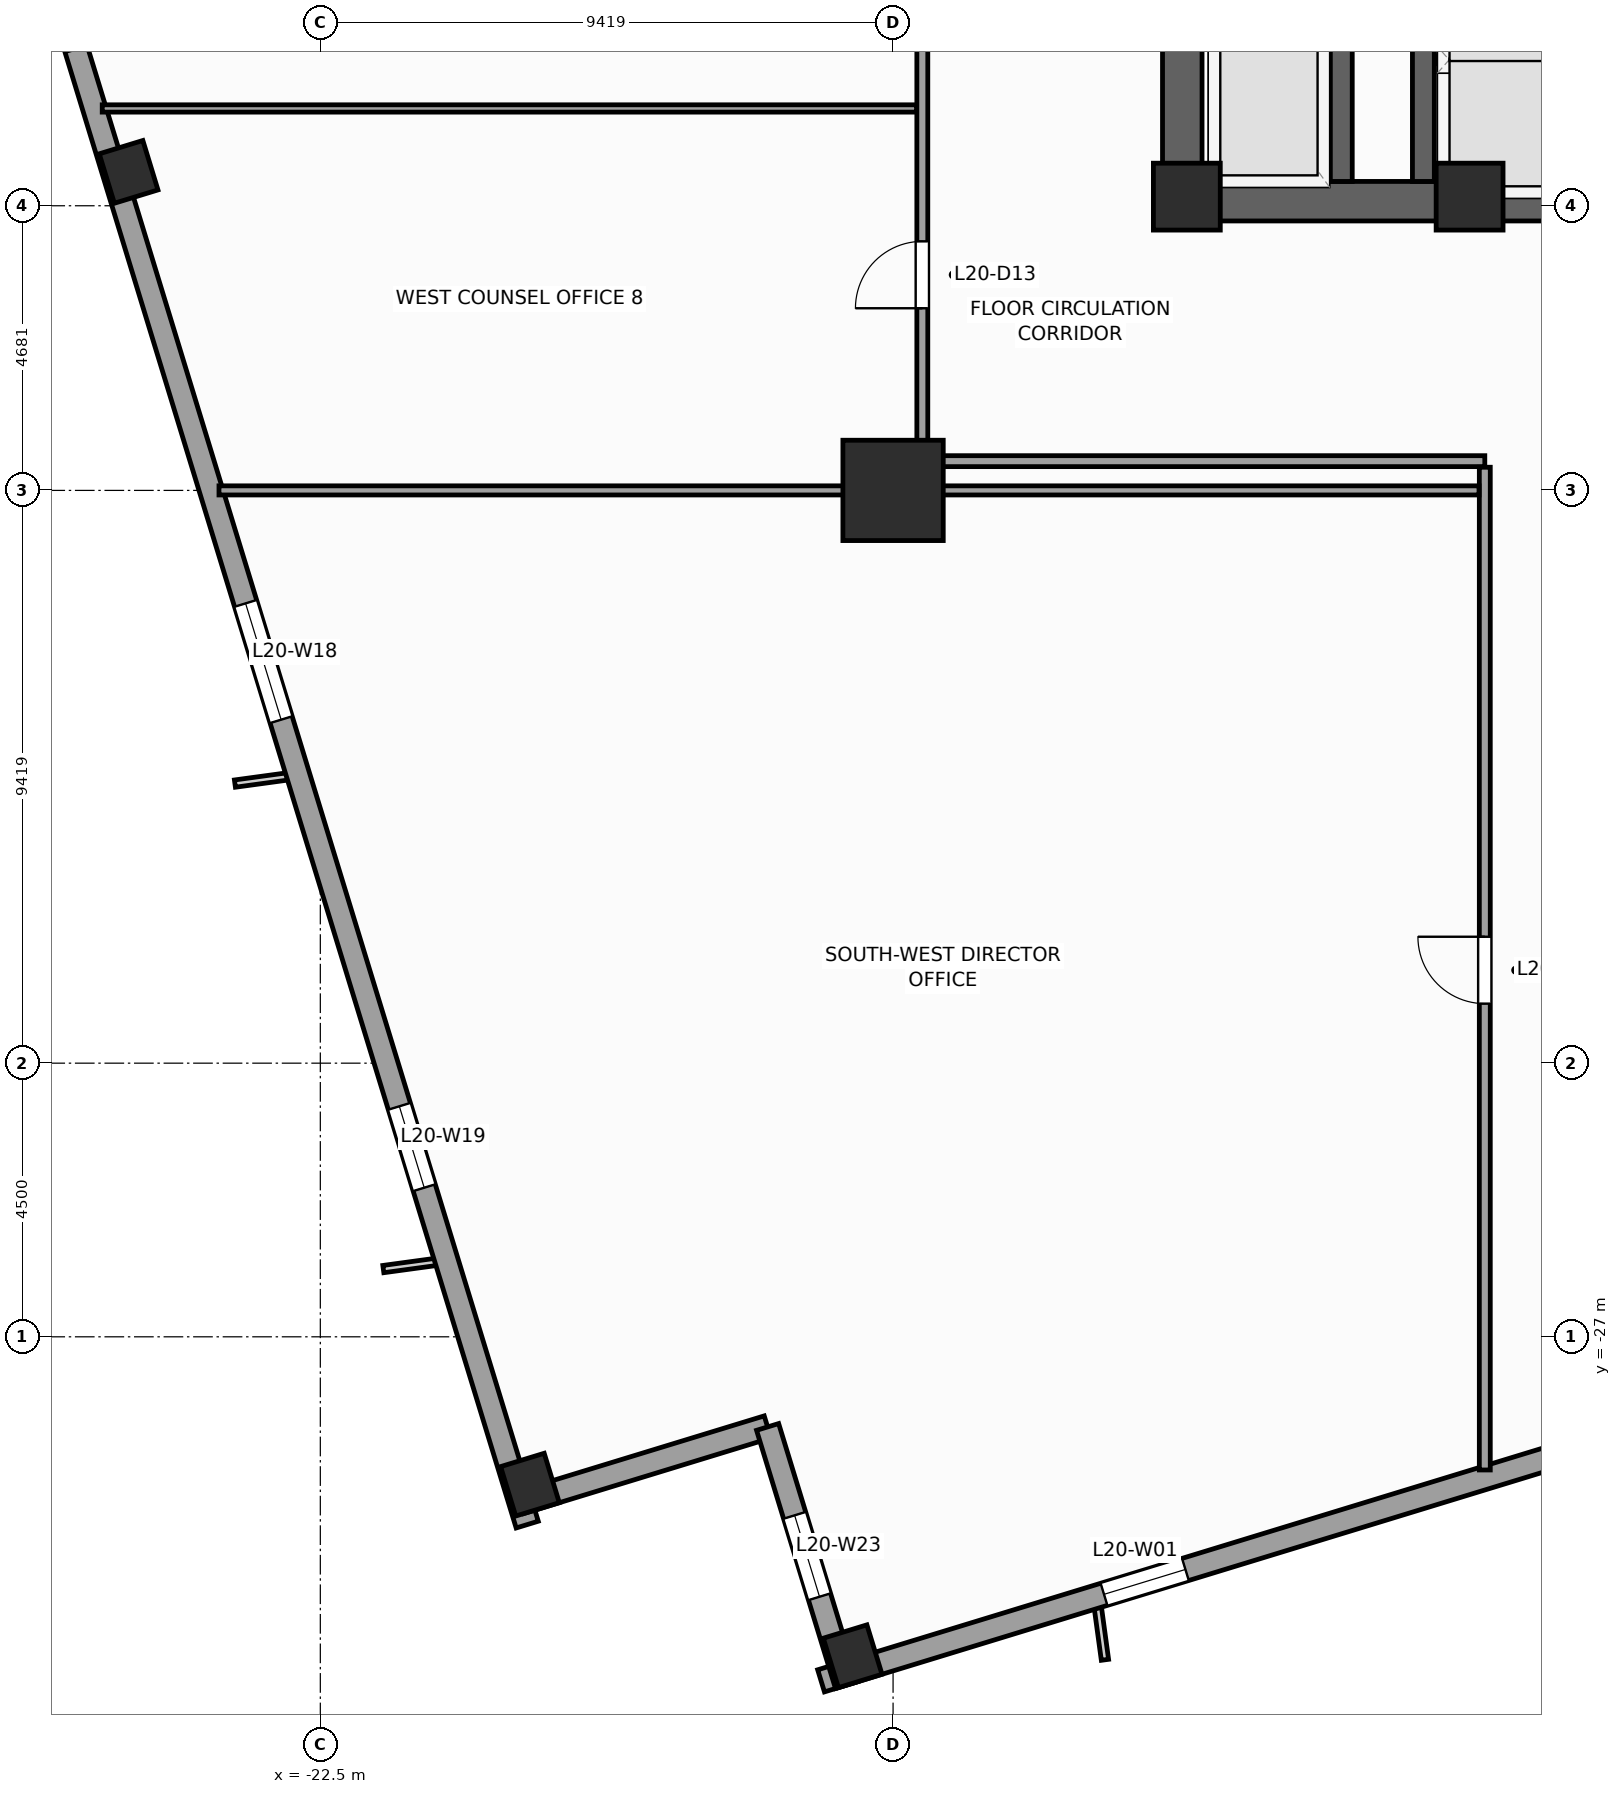
"""IFC4 building model, lengths in metres.
Left out: names, types, materials, properties, quantities, classifications, styles, units other than length and angle.
Written with IfcOpenShell. Run it as: python <this file> out.ifc"""

import sys

from ifc_helpers import new_model, si_unit, direction, frame, frame_2d, origin, origin_2d, place, context, subcontext, project, spatial, rectangle, extrude, source, transform, mapped, element, fill, save


model = new_model("IFC4")
c1 = context("Model", 3, precision=1e-05, world=origin(), true_north=direction((0.0, 1.0)))
c2 = subcontext(c1, "Body", "Model", "MODEL_VIEW")
j1 = project(units=[si_unit("LENGTHUNIT", "METRE"), si_unit("PLANEANGLEUNIT", "RADIAN")], contexts=[c1])
p1 = place(None, origin())
s1 = spatial("IfcSite", under=j1, at=p1, CompositionType="ELEMENT")
p2 = place(p1, origin())
s2 = spatial("IfcBuilding", under=s1, at=p2, CompositionType="ELEMENT")
p3 = place(p2, frame((0.0, 0.0, 87.2)))
s3 = spatial("IfcBuildingStorey", under=s2, at=p3, CompositionType="ELEMENT", Elevation=87.2)
p4 = place(p3, frame((-8.65, -8.325, 0.0), z_axis=(0.0, 0.0, 1.0), x_axis=(1.0, 0.0, 0.0)))
e1 = element("IfcWall", 1, at=p4, inside=s3, PredefinedType="SHEAR", context=c2, shape_type="SweptSolid", body=[
    extrude(rectangle(XDim=17.3, YDim=0.65, at=frame_2d((8.65, 0.0))), origin(), (0.0, 0.0, 1.0), 4.0),
])
p5 = place(p4, frame((8.0, 0.0, 0.0)))
e2 = element("IfcOpeningElement", 2, at=p5, cuts=e1, PredefinedType="OPENING", context=c2, shape_type="SweptSolid", body=[
    extrude(rectangle(XDim=1.3, YDim=2.2, at=frame_2d((0.65, 1.1))), frame((0.0, 0.335, 0.0), z_axis=(0.0, -1.0, 0.0), x_axis=(1.0, 0.0, 0.0)), (0.0, 0.0, 1.0), 0.67),
])
p6 = place(p3, frame((-8.325, -8.0, 0.0), z_axis=(0.0, 0.0, 1.0), x_axis=(0.0, 1.0, 0.0)))
e3 = element("IfcWall", 3, at=p6, inside=s3, PredefinedType="SHEAR", context=c2, shape_type="SweptSolid", body=[
    extrude(rectangle(XDim=16.0, YDim=0.65, at=frame_2d((8.0, 0.0))), origin(), (0.0, 0.0, 1.0), 4.0),
])
p7 = place(p6, frame((4.69, 0.0, 0.0)))
e4 = element("IfcOpeningElement", 4, at=p7, cuts=e3, PredefinedType="OPENING", context=c2, shape_type="SweptSolid", body=[
    extrude(rectangle(XDim=1.3, YDim=2.2, at=frame_2d((0.65, 1.1))), frame((0.0, 0.335, 0.0), z_axis=(0.0, -1.0, 0.0), x_axis=(1.0, 0.0, 0.0)), (0.0, 0.0, 1.0), 0.67),
])
p8 = place(p3, frame((-4.36, -8.0, 0.0), z_axis=(0.0, 0.0, 1.0), x_axis=(0.0, 1.0, 0.0)))
e5 = element("IfcWall", 5, at=p8, inside=s3, PredefinedType="SHEAR", context=c2, shape_type="SweptSolid", body=[
    extrude(rectangle(XDim=16.0, YDim=0.36, at=frame_2d((8.0, 0.0))), origin(), (0.0, 0.0, 1.0), 4.0),
])
p9 = place(p3, frame((-5.71, -8.0, 0.0), z_axis=(0.0, 0.0, 1.0), x_axis=(0.0, 1.0, 0.0)))
e6 = element("IfcWall", 6, at=p9, inside=s3, PredefinedType="SHEAR", context=c2, shape_type="SweptSolid", body=[
    extrude(rectangle(XDim=2.54, YDim=0.36, at=frame_2d((1.27, 0.0))), origin(), (0.0, 0.0, 1.0), 4.0),
])
m1 = source(origin(), c2, "Body", "SweptSolid", [
    extrude(rectangle(XDim=1.1, YDim=1.1, at=origin_2d()), origin(), (0.0, 0.0, 1.0), 4.0),
])
for number, where, z_axis, x_axis in (
    (7, (-8.25, -8.25, 0.0), (0.0, 0.0, 1.0), (1.0, 0.0, 0.0)),
    (8, (-3.6, -8.25, 0.0), (0.0, 0.0, 1.0), (1.0, 0.0, 0.0)),
):
    element("IfcColumn", number, at=place(p3, frame(where, z_axis=z_axis, x_axis=x_axis)), inside=s3, PredefinedType="PILASTER", context=c2, shape_type="MappedRepresentation", body=[
        mapped(m1, transform((0.0, 0.0, 0.0), scale=1.0)),
    ])
m2 = source(origin(), c2, "Body", "SweptSolid", [
    extrude(rectangle(XDim=1.65, YDim=1.65, at=origin_2d()), origin(), (0.0, 0.0, 1.0), 4.0),
])
p10 = place(p3, frame((-13.081, -13.081, 0.0), z_axis=(0.0, 0.0, 1.0), x_axis=(1.0, 0.0, 0.0)))
e9 = element("IfcColumn", 9, at=p10, inside=s3, PredefinedType="COLUMN", context=c2, shape_type="MappedRepresentation", body=[
    mapped(m2, transform((0.0, 0.0, 0.0), scale=1.0)),
])
m3 = source(origin(), c2, "Body", "SweptSolid", [
    extrude(rectangle(XDim=0.75, YDim=0.85, at=origin_2d()), origin(), (0.0, 0.0, 1.0), 4.0),
])
for number, where, z_axis, x_axis in (
    (10, (-13.746, -32.253, 0.0), (0.0, 0.0, 1.0), (0.956, 0.292, 0.0)),
    (11, (-25.653, -7.843, 0.0), (0.0, 0.0, 1.0), (0.956, 0.292, 0.0)),
    (12, (-19.052, -29.431, 0.0), (0.0, 0.0, 1.0), (0.956, 0.292, 0.0)),
):
    element("IfcColumn", number, at=place(p3, frame(where, z_axis=z_axis, x_axis=x_axis)), inside=s3, PredefinedType="COLUMN", context=c2, shape_type="MappedRepresentation", body=[
        mapped(m3, transform((0.0, 0.0, 0.0), scale=1.0)),
    ])
p11 = place(p3, frame((-14.265, -32.658, 0.0), z_axis=(0.0, 0.0, 1.0), x_axis=(0.956304320851, 0.292373127906, 0.0)))
e13 = element("IfcWall", 13, at=p11, inside=s3, PredefinedType="STANDARD", context=c2, shape_type="SweptSolid", body=[
    extrude(rectangle(XDim=46.38, YDim=0.38, at=frame_2d((23.19, 0.0))), origin(), (0.0, 0.0, 1.0), 3.14),
])
p12 = place(p11, frame((28.265, 0.0, 0.0)))
e14 = element("IfcOpeningElement", 14, at=p12, cuts=e13, PredefinedType="OPENING", context=c2, shape_type="SweptSolid", body=[
    extrude(rectangle(XDim=1.05, YDim=2.25, at=frame_2d((0.525, 1.125))), frame((0.0, 0.2, 0.0), z_axis=(0.0, -1.0, 0.0), x_axis=(1.0, 0.0, 0.0)), (0.0, 0.0, 1.0), 0.4),
])
p13 = place(p11, frame((4.865, 0.0, 0.51)))
e15 = element("IfcOpeningElement", 15, at=p13, cuts=e13, PredefinedType="OPENING", context=c2, shape_type="SweptSolid", body=[
    extrude(rectangle(XDim=1.4, YDim=2.4, at=frame_2d((0.7, 1.2))), frame((0.0, 0.2, 0.0), z_axis=(0.0, -1.0, 0.0), x_axis=(1.0, 0.0, 0.0)), (0.0, 0.0, 1.0), 0.4),
])
p14 = place(p11, frame((14.7, 0.0, 0.51)))
e16 = element("IfcOpeningElement", 16, at=p14, cuts=e13, PredefinedType="OPENING", context=c2, shape_type="SweptSolid", body=[
    extrude(rectangle(XDim=2.0, YDim=2.4, at=frame_2d((1.0, 1.2))), frame((0.0, 0.2, 0.0), z_axis=(0.0, -1.0, 0.0), x_axis=(1.0, 0.0, 0.0)), (0.0, 0.0, 1.0), 0.4),
])
p15 = place(p11, frame((20.512, 0.0, 0.51)))
e17 = element("IfcOpeningElement", 17, at=p15, cuts=e13, PredefinedType="OPENING", context=c2, shape_type="SweptSolid", body=[
    extrude(rectangle(XDim=2.0, YDim=2.4, at=frame_2d((1.0, 1.2))), frame((0.0, 0.2, 0.0), z_axis=(0.0, -1.0, 0.0), x_axis=(1.0, 0.0, 0.0)), (0.0, 0.0, 1.0), 0.4),
])
p16 = place(p11, frame((30.538, 0.0, 0.51)))
e18 = element("IfcOpeningElement", 18, at=p16, cuts=e13, PredefinedType="OPENING", context=c2, shape_type="SweptSolid", body=[
    extrude(rectangle(XDim=2.0, YDim=2.4, at=frame_2d((1.0, 1.2))), frame((0.0, 0.2, 0.0), z_axis=(0.0, -1.0, 0.0), x_axis=(1.0, 0.0, 0.0)), (0.0, 0.0, 1.0), 0.4),
])
p17 = place(p11, frame((39.187, 0.0, 0.51)))
e19 = element("IfcOpeningElement", 19, at=p17, cuts=e13, PredefinedType="OPENING", context=c2, shape_type="SweptSolid", body=[
    extrude(rectangle(XDim=1.4, YDim=2.4, at=frame_2d((0.7, 1.2))), frame((0.0, 0.2, 0.0), z_axis=(0.0, -1.0, 0.0), x_axis=(1.0, 0.0, 0.0)), (0.0, 0.0, 1.0), 0.4),
])
p18 = place(p3, frame((-32.658, 14.265, 0.0), z_axis=(0.0, 0.0, 1.0), x_axis=(0.292373127906, -0.956304320851, 0.0)))
e20 = element("IfcWall", 20, at=p18, inside=s3, PredefinedType="STANDARD", context=c2, shape_type="SweptSolid", body=[
    extrude(rectangle(XDim=46.38, YDim=0.38, at=frame_2d((23.19, 0.0))), origin(), (0.0, 0.0, 1.0), 3.14),
])
p19 = place(p18, frame((4.865, 0.0, 0.51)))
e21 = element("IfcOpeningElement", 21, at=p19, cuts=e20, PredefinedType="OPENING", context=c2, shape_type="SweptSolid", body=[
    extrude(rectangle(XDim=1.4, YDim=2.4, at=frame_2d((0.7, 1.2))), frame((0.0, 0.2, 0.0), z_axis=(0.0, -1.0, 0.0), x_axis=(1.0, 0.0, 0.0)), (0.0, 0.0, 1.0), 0.4),
])
p20 = place(p18, frame((10.95, 0.0, 0.51)))
e22 = element("IfcOpeningElement", 22, at=p20, cuts=e20, PredefinedType="OPENING", context=c2, shape_type="SweptSolid", body=[
    extrude(rectangle(XDim=2.0, YDim=2.4, at=frame_2d((1.0, 1.2))), frame((0.0, 0.2, 0.0), z_axis=(0.0, -1.0, 0.0), x_axis=(1.0, 0.0, 0.0)), (0.0, 0.0, 1.0), 0.4),
])
p21 = place(p18, frame((19.012, 0.0, 0.51)))
e23 = element("IfcOpeningElement", 23, at=p21, cuts=e20, PredefinedType="OPENING", context=c2, shape_type="SweptSolid", body=[
    extrude(rectangle(XDim=2.0, YDim=2.4, at=frame_2d((1.0, 1.2))), frame((0.0, 0.2, 0.0), z_axis=(0.0, -1.0, 0.0), x_axis=(1.0, 0.0, 0.0)), (0.0, 0.0, 1.0), 0.4),
])
p22 = place(p18, frame((30.538, 0.0, 0.51)))
e24 = element("IfcOpeningElement", 24, at=p22, cuts=e20, PredefinedType="OPENING", context=c2, shape_type="SweptSolid", body=[
    extrude(rectangle(XDim=2.0, YDim=2.4, at=frame_2d((1.0, 1.2))), frame((0.0, 0.2, 0.0), z_axis=(0.0, -1.0, 0.0), x_axis=(1.0, 0.0, 0.0)), (0.0, 0.0, 1.0), 0.4),
])
p23 = place(p18, frame((39.187, 0.0, 0.51)))
e25 = element("IfcOpeningElement", 25, at=p23, cuts=e20, PredefinedType="OPENING", context=c2, shape_type="SweptSolid", body=[
    extrude(rectangle(XDim=1.4, YDim=2.4, at=frame_2d((0.7, 1.2))), frame((0.0, 0.2, 0.0), z_axis=(0.0, -1.0, 0.0), x_axis=(1.0, 0.0, 0.0)), (0.0, 0.0, 1.0), 0.4),
])
p24 = place(p3, frame((-19.208, -29.725, 0.0), z_axis=(0.0, 0.0, 1.0), x_axis=(0.956312764915, 0.292345507338, 0.0)))
e26 = element("IfcWall", 26, at=p24, inside=s3, PredefinedType="STANDARD", context=c2, shape_type="SweptSolid", body=[
    extrude(rectangle(XDim=4.25, YDim=0.38, at=frame_2d((2.125, 0.0))), origin(), (0.0, 0.0, 1.0), 3.74),
])
p25 = place(p3, frame((-15.144, -28.482, 0.0), z_axis=(0.0, 0.0, 1.0), x_axis=(0.292373601522, -0.956304176051, 0.0)))
e27 = element("IfcWall", 27, at=p25, inside=s3, PredefinedType="STANDARD", context=c2, shape_type="SweptSolid", body=[
    extrude(rectangle(XDim=4.44, YDim=0.38, at=frame_2d((2.22, 0.0))), origin(), (0.0, 0.0, 1.0), 3.04),
])
p26 = place(p25, frame((1.52, 0.0, 0.51)))
e28 = element("IfcOpeningElement", 28, at=p26, cuts=e27, PredefinedType="OPENING", context=c2, shape_type="SweptSolid", body=[
    extrude(rectangle(XDim=1.4, YDim=2.4, at=frame_2d((0.7, 1.2))), frame((0.0, 0.2, 0.0), z_axis=(0.0, -1.0, 0.0), x_axis=(1.0, 0.0, 0.0)), (0.0, 0.0, 1.0), 0.4),
])
p27 = place(p3, frame((-4.16, -6.0, 0.0), z_axis=(0.0, 0.0, 1.0), x_axis=(1.0, 0.0, 0.0)))
e29 = element("IfcWall", 29, at=p27, inside=s3, PredefinedType="PARTITIONING", context=c2, shape_type="SweptSolid", body=[
    extrude(rectangle(XDim=2.26, YDim=0.12, at=frame_2d((1.13, 0.0))), origin(), (0.0, 0.0, 1.0), 3.74),
])
p28 = place(p3, frame((-12.6, -12.6, 0.0), z_axis=(0.0, 0.0, 1.0), x_axis=(1.0, 0.0, 0.0)))
e30 = element("IfcWall", 30, at=p28, inside=s3, PredefinedType="PARTITIONING", context=c2, shape_type="SweptSolid", body=[
    extrude(rectangle(XDim=9.25, YDim=0.18, at=frame_2d((4.625, 0.0))), origin(), (0.0, 0.0, 1.0), 3.74),
])
p29 = place(p3, frame((-12.6, -12.6, 0.0), z_axis=(0.0, 0.0, 1.0), x_axis=(0.0, 1.0, 0.0)))
e31 = element("IfcWall", 31, at=p29, inside=s3, PredefinedType="PARTITIONING", context=c2, shape_type="SweptSolid", body=[
    extrude(rectangle(XDim=11.45, YDim=0.18, at=frame_2d((5.725, 0.0))), origin(), (0.0, 0.0, 1.0), 3.74),
])
p30 = place(p29, frame((2.514, 0.0, 0.0)))
e32 = element("IfcOpeningElement", 32, at=p30, cuts=e31, PredefinedType="OPENING", context=c2, shape_type="SweptSolid", body=[
    extrude(rectangle(XDim=1.1, YDim=2.2, at=frame_2d((0.55, 1.1))), frame((0.0, 0.1, 0.0), z_axis=(0.0, -1.0, 0.0), x_axis=(1.0, 0.0, 0.0)), (0.0, 0.0, 1.0), 0.2),
])
p31 = place(p3, frame((-3.35, -29.19, 0.0), z_axis=(0.0, 0.0, 1.0), x_axis=(0.0, 1.0, 0.0)))
e33 = element("IfcWall", 33, at=p31, inside=s3, PredefinedType="PARTITIONING", context=c2, shape_type="SweptSolid", body=[
    extrude(rectangle(XDim=16.49, YDim=0.18, at=frame_2d((8.245, 0.0))), origin(), (0.0, 0.0, 1.0), 3.41),
])
p32 = place(p31, frame((7.669, 0.0, 0.0)))
e34 = element("IfcOpeningElement", 34, at=p32, cuts=e33, PredefinedType="OPENING", context=c2, shape_type="SweptSolid", body=[
    extrude(rectangle(XDim=1.1, YDim=2.2, at=frame_2d((0.55, 1.1))), frame((0.0, 0.1, 0.0), z_axis=(0.0, -1.0, 0.0), x_axis=(1.0, 0.0, 0.0)), (0.0, 0.0, 1.0), 0.2),
])
p33 = place(p3, frame((-24.167, -13.081, 0.0), z_axis=(0.0, 0.0, 1.0), x_axis=(1.0, 0.0, 0.0)))
e35 = element("IfcWall", 35, at=p33, inside=s3, PredefinedType="PARTITIONING", context=c2, shape_type="SweptSolid", body=[
    extrude(rectangle(XDim=20.721, YDim=0.15, at=frame_2d((10.361, 0.0))), origin(), (0.0, 0.0, 1.0), 2.732),
])
p34 = place(p3, frame((-26.087, -6.8, 0.0), z_axis=(0.0, 0.0, 1.0), x_axis=(1.0, 0.0, 0.0)))
e36 = element("IfcWall", 36, at=p34, inside=s3, PredefinedType="PARTITIONING", context=c2, shape_type="SweptSolid", body=[
    extrude(rectangle(XDim=13.392, YDim=0.12, at=frame_2d((6.696, 0.0))), origin(), (0.0, 0.0, 1.0), 3.74),
])
m4 = source(origin(), c2, "Body", "SweptSolid", [
    extrude(rectangle(XDim=1.4, YDim=2.4, at=frame_2d((0.7, 1.2))), frame((0.0, 0.03, 0.0), z_axis=(0.0, -1.0, 0.0), x_axis=(1.0, 0.0, 0.0)), (0.0, 0.0, 1.0), 0.06),
])
p35 = place(p13, origin())
e37 = element("IfcWindow", 37, at=p35, inside=s3, PartitioningType="SINGLE_PANEL", PredefinedType="WINDOW", context=c2, shape_type="MappedRepresentation", body=[
    mapped(m4, transform((0.0, 0.0, 0.0), scale=1.0)),
])
fill(e15, e37)
m5 = source(origin(), c2, "Body", "SweptSolid", [
    extrude(rectangle(XDim=2.0, YDim=2.4, at=frame_2d((1.0, 1.2))), frame((0.0, 0.03, 0.0), z_axis=(0.0, -1.0, 0.0), x_axis=(1.0, 0.0, 0.0)), (0.0, 0.0, 1.0), 0.06),
])
p36 = place(p22, origin())
e38 = element("IfcWindow", 38, at=p36, inside=s3, PartitioningType="SINGLE_PANEL", PredefinedType="WINDOW", context=c2, shape_type="MappedRepresentation", body=[
    mapped(m5, transform((0.0, 0.0, 0.0), scale=1.0)),
])
fill(e24, e38)
p37 = place(p23, origin())
e39 = element("IfcWindow", 39, at=p37, inside=s3, PartitioningType="SINGLE_PANEL", PredefinedType="WINDOW", context=c2, shape_type="MappedRepresentation", body=[
    mapped(m4, transform((0.0, 0.0, 0.0), scale=1.0)),
])
fill(e25, e39)
p38 = place(p26, origin())
e40 = element("IfcWindow", 40, at=p38, inside=s3, PartitioningType="SINGLE_PANEL", PredefinedType="WINDOW", context=c2, shape_type="MappedRepresentation", body=[
    mapped(m4, transform((0.0, 0.0, 0.0), scale=1.0)),
])
fill(e28, e40)
m6 = source(origin(), c2, "Body", "SweptSolid", [
    extrude(rectangle(XDim=1.1, YDim=2.2, at=frame_2d((0.55, 1.1))), frame((0.0, 0.025, 0.0), z_axis=(0.0, -1.0, 0.0), x_axis=(1.0, 0.0, 0.0)), (0.0, 0.0, 1.0), 0.05),
])
p39 = place(p30, origin())
e41 = element("IfcDoor", 41, at=p39, inside=s3, OperationType="SINGLE_SWING_LEFT", PredefinedType="DOOR", context=c2, shape_type="MappedRepresentation", body=[
    mapped(m6, transform((0.0, 0.0, 0.0), scale=1.0)),
])
fill(e32, e41)
p40 = place(p32, origin())
e42 = element("IfcDoor", 42, at=p40, inside=s3, OperationType="SINGLE_SWING_RIGHT", PredefinedType="DOOR", context=c2, shape_type="MappedRepresentation", body=[
    mapped(m6, transform((0.0, 0.0, 0.0), scale=1.0)),
])
fill(e34, e42)
save(model, sys.argv[1])
